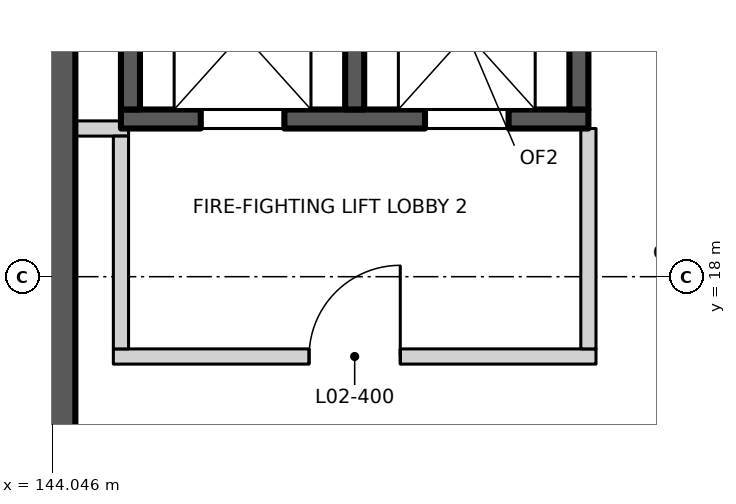
"""IFC4 building model, lengths in metres.
Left out: names, types, materials, properties, quantities, classifications, styles, units other than length and angle.
Written with IfcOpenShell. Run it as: python <this file> out.ifc"""

import sys

from ifc_helpers import new_model, si_unit, direction, frame, frame_2d, origin, place, context, subcontext, project, spatial, rectangle, extrude, element, fill, save


model = new_model("IFC4")
c1 = context("Model", 3, precision=1e-05, world=origin(), true_north=direction((0.0, 1.0)))
c2 = subcontext(c1, "Body", "Model", "MODEL_VIEW")
j1 = project(units=[si_unit("LENGTHUNIT", "METRE"), si_unit("PLANEANGLEUNIT", "RADIAN")], contexts=[c1])
p1 = place(None, origin())
s1 = spatial("IfcSite", under=j1, at=p1, CompositionType="ELEMENT")
p2 = place(p1, origin())
s2 = spatial("IfcBuilding", under=s1, at=p2, CompositionType="ELEMENT")
p3 = place(p2, frame((0.0, 0.0, 10.5)))
s3 = spatial("IfcBuildingStorey", under=s2, at=p3, CompositionType="ELEMENT", Elevation=10.5)
p4 = place(p3, frame((144.95, 20.075, 0.0), z_axis=(0.0, 0.0, 1.0), x_axis=(1.0, 0.0, 0.0)))
e1 = element("IfcWall", 1, at=p4, inside=s3, PredefinedType="SHEAR", context=c2, shape_type="SweptSolid", body=[
    extrude(rectangle(XDim=6.15, YDim=0.25, at=frame_2d((3.075, 0.0))), origin(), (0.0, 0.0, 1.0), 4.5),
])
p5 = place(p4, frame((1.05, 0.0, 0.0)))
e2 = element("IfcOpeningElement", 2, at=p5, cuts=e1, PredefinedType="OPENING", context=c2, shape_type="SweptSolid", body=[
    extrude(rectangle(XDim=1.1, YDim=2.1, at=frame_2d((0.55, 1.05))), frame((0.0, 0.135, 0.0), z_axis=(0.0, -1.0, 0.0), x_axis=(1.0, 0.0, 0.0)), (0.0, 0.0, 1.0), 0.27),
])
p6 = place(p4, frame((4.0, 0.0, 0.0)))
e3 = element("IfcOpeningElement", 3, at=p6, cuts=e1, PredefinedType="OPENING", context=c2, shape_type="SweptSolid", body=[
    extrude(rectangle(XDim=1.1, YDim=2.1, at=frame_2d((0.55, 1.05))), frame((0.0, 0.135, 0.0), z_axis=(0.0, -1.0, 0.0), x_axis=(1.0, 0.0, 0.0)), (0.0, 0.0, 1.0), 0.27),
])
for number, where, z_axis, x_axis in (
    (4, (145.075, 20.2, 0.0), (0.0, 0.0, 1.0), (0.0, 1.0, 0.0)),
    (5, (148.025, 20.2, 0.0), (0.0, 0.0, 1.0), (0.0, 1.0, 0.0)),
    (6, (150.975, 20.2, 0.0), (0.0, 0.0, 1.0), (0.0, 1.0, 0.0)),
):
    element("IfcWall", number, at=place(p3, frame(where, z_axis=z_axis, x_axis=x_axis)), inside=s3, PredefinedType="SHEAR", context=c2, shape_type="SweptSolid", body=[
        extrude(rectangle(XDim=2.7, YDim=0.25, at=frame_2d((1.35, 0.0))), origin(), (0.0, 0.0, 1.0), 4.5),
    ])
p7 = place(p3, frame((144.85, 16.95, 0.0), z_axis=(0.0, 0.0, 1.0), x_axis=(1.0, 0.0, 0.0)))
e7 = element("IfcWall", 7, at=p7, inside=s3, PredefinedType="PARTITIONING", context=c2, shape_type="SweptSolid", body=[
    extrude(rectangle(XDim=6.35, YDim=0.2, at=frame_2d((3.175, 0.0))), origin(), (0.0, 0.0, 1.0), 4.2),
])
p8 = place(p7, frame((2.575, 0.0, 0.0)))
e8 = element("IfcOpeningElement", 8, at=p8, cuts=e7, PredefinedType="OPENING", context=c2, shape_type="SweptSolid", body=[
    extrude(rectangle(XDim=1.2, YDim=2.1, at=frame_2d((0.6, 1.05))), frame((0.0, 0.11, 0.0), z_axis=(0.0, -1.0, 0.0), x_axis=(1.0, 0.0, 0.0)), (0.0, 0.0, 1.0), 0.22),
])
p9 = place(p3, frame((144.35, 19.95, 0.0), z_axis=(0.0, 0.0, 1.0), x_axis=(1.0, 0.0, 0.0)))
e9 = element("IfcWall", 9, at=p9, inside=s3, PredefinedType="PARTITIONING", context=c2, shape_type="SweptSolid", body=[
    extrude(rectangle(XDim=0.7, YDim=0.2, at=frame_2d((0.35, 0.0))), origin(), (0.0, 0.0, 1.0), 4.2),
])
p10 = place(p3, frame((144.175, 9.35, 0.0), z_axis=(0.0, 0.0, 1.0), x_axis=(0.0, 1.0, 0.0)))
e10 = element("IfcWall", 10, at=p10, inside=s3, PredefinedType="SHEAR", context=c2, shape_type="SweptSolid", body=[
    extrude(rectangle(XDim=17.4, YDim=0.35, at=frame_2d((8.7, 0.0))), origin(), (0.0, 0.0, 1.0), 4.2),
])
p11 = place(p10, frame((3.75, 0.0, 0.0)))
e11 = element("IfcOpeningElement", 11, at=p11, cuts=e10, PredefinedType="OPENING", context=c2, shape_type="SweptSolid", body=[
    extrude(rectangle(XDim=1.6, YDim=2.4, at=frame_2d((0.8, 1.2))), frame((0.0, 0.185, 0.0), z_axis=(0.0, -1.0, 0.0), x_axis=(1.0, 0.0, 0.0)), (0.0, 0.0, 1.0), 0.37),
])
p12 = place(p3, frame((144.95, 17.05, 0.0), z_axis=(0.0, 0.0, 1.0), x_axis=(0.0, 1.0, 0.0)))
e12 = element("IfcWall", 12, at=p12, inside=s3, PredefinedType="PARTITIONING", context=c2, shape_type="SweptSolid", body=[
    extrude(rectangle(XDim=2.8, YDim=0.2, at=frame_2d((1.4, 0.0))), origin(), (0.0, 0.0, 1.0), 4.2),
])
p13 = place(p3, frame((151.1, 17.05, 0.0), z_axis=(0.0, 0.0, 1.0), x_axis=(0.0, 1.0, 0.0)))
e13 = element("IfcWall", 13, at=p13, inside=s3, PredefinedType="PARTITIONING", context=c2, shape_type="SweptSolid", body=[
    extrude(rectangle(XDim=2.9, YDim=0.2, at=frame_2d((1.45, 0.0))), origin(), (0.0, 0.0, 1.0), 4.2),
])
p14 = place(p5, origin())
e14 = element("IfcDoor", 14, at=p14, inside=s3, OperationType="DOUBLE_DOOR_SLIDING", PredefinedType="DOOR", context=c2, shape_type="SweptSolid", body=[
    extrude(rectangle(XDim=1.1, YDim=2.1, at=frame_2d((0.55, 1.05))), frame((0.0, 0.025, 0.0), z_axis=(0.0, -1.0, 0.0), x_axis=(1.0, 0.0, 0.0)), (0.0, 0.0, 1.0), 0.05),
])
fill(e2, e14)
p15 = place(p6, origin())
e15 = element("IfcDoor", 15, at=p15, inside=s3, OperationType="DOUBLE_DOOR_SLIDING", PredefinedType="DOOR", context=c2, shape_type="SweptSolid", body=[
    extrude(rectangle(XDim=1.1, YDim=2.1, at=frame_2d((0.55, 1.05))), frame((0.0, 0.025, 0.0), z_axis=(0.0, -1.0, 0.0), x_axis=(1.0, 0.0, 0.0)), (0.0, 0.0, 1.0), 0.05),
])
fill(e3, e15)
p16 = place(p8, origin())
e16 = element("IfcDoor", 16, at=p16, inside=s3, OperationType="SINGLE_SWING_RIGHT", PredefinedType="DOOR", context=c2, shape_type="SweptSolid", body=[
    extrude(rectangle(XDim=1.2, YDim=2.1, at=frame_2d((0.6, 1.05))), frame((0.0, 0.025, 0.0), z_axis=(0.0, -1.0, 0.0), x_axis=(1.0, 0.0, 0.0)), (0.0, 0.0, 1.0), 0.05),
])
fill(e8, e16)
save(model, sys.argv[1])
